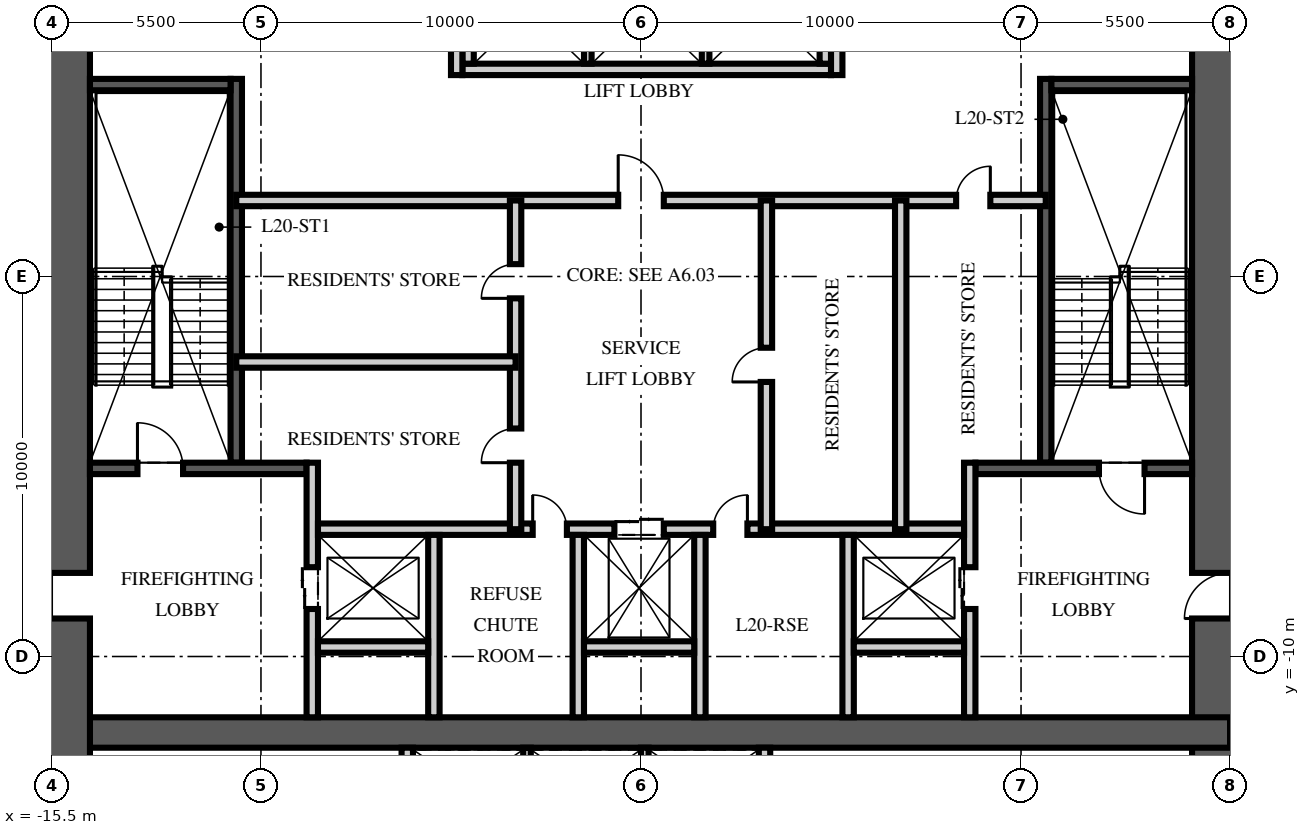
"""IFC4 building model, lengths in metres.
Left out: names, types, materials, properties, quantities, classifications, styles, units other than length and angle.
Written with IfcOpenShell. Run it as: python <this file> out.ifc"""

import sys

from ifc_helpers import new_model, si_unit, direction, frame, frame_2d, origin, place, context, subcontext, project, spatial, rectangle, extrude, element, fill, save


model = new_model("IFC4")
c1 = context("Model", 3, precision=1e-05, world=origin(), true_north=direction((0.0, 1.0)))
c2 = subcontext(c1, "Body", "Model", "MODEL_VIEW")
j1 = project(units=[si_unit("LENGTHUNIT", "METRE"), si_unit("PLANEANGLEUNIT", "RADIAN")], contexts=[c1])
p1 = place(None, origin())
s1 = spatial("IfcSite", under=j1, at=p1, CompositionType="ELEMENT")
p2 = place(p1, origin())
s2 = spatial("IfcBuilding", under=s1, at=p2, CompositionType="ELEMENT")
p3 = place(p2, frame((0.0, 0.0, 81.0)))
s3 = spatial("IfcBuildingStorey", under=s2, at=p3, CompositionType="ELEMENT", Elevation=81.0)
p4 = place(p3, frame((15.5, -15.5, -0.25), z_axis=(0.0, 0.0, 1.0), x_axis=(0.0, 1.0, 0.0)))
e1 = element("IfcWall", 1, at=p4, inside=s3, PredefinedType="SHEAR", context=c2, shape_type="SweptSolid", body=[
    extrude(rectangle(XDim=31.0, YDim=2.0, at=frame_2d((15.5, 0.0))), origin(), (0.0, 0.0, 1.0), 3.75),
])
p5 = place(p4, frame((6.5, 0.0, 0.25)))
e2 = element("IfcOpeningElement", 2, at=p5, cuts=e1, PredefinedType="OPENING", context=c2, shape_type="SweptSolid", body=[
    extrude(rectangle(XDim=1.2, YDim=2.1, at=frame_2d((0.6, 1.05))), frame((0.0, 1.01, 0.0), z_axis=(0.0, -1.0, 0.0), x_axis=(1.0, 0.0, 0.0)), (0.0, 0.0, 1.0), 2.02),
])
p6 = place(p4, frame((23.0, 0.0, 0.25)))
e3 = element("IfcOpeningElement", 3, at=p6, cuts=e1, PredefinedType="OPENING", context=c2, shape_type="SweptSolid", body=[
    extrude(rectangle(XDim=1.8, YDim=2.1, at=frame_2d((0.9, 1.05))), frame((0.0, 1.01, 0.0), z_axis=(0.0, -1.0, 0.0), x_axis=(1.0, 0.0, 0.0)), (0.0, 0.0, 1.0), 2.02),
])
p7 = place(p3, frame((-15.5, -12.0, -0.25), z_axis=(0.0, 0.0, 1.0), x_axis=(1.0, 0.0, 0.0)))
e4 = element("IfcWall", 4, at=p7, inside=s3, PredefinedType="SHEAR", context=c2, shape_type="SweptSolid", body=[
    extrude(rectangle(XDim=31.0, YDim=0.8, at=frame_2d((15.5, 0.0))), origin(), (0.0, 0.0, 1.0), 3.75),
])
p8 = place(p3, frame((-15.5, -15.5, -0.25), z_axis=(0.0, 0.0, 1.0), x_axis=(0.0, 1.0, 0.0)))
e5 = element("IfcWall", 5, at=p8, inside=s3, PredefinedType="SHEAR", context=c2, shape_type="SweptSolid", body=[
    extrude(rectangle(XDim=31.0, YDim=2.0, at=frame_2d((15.5, 0.0))), origin(), (0.0, 0.0, 1.0), 3.75),
])
p9 = place(p8, frame((6.5, 0.0, 0.25)))
e6 = element("IfcOpeningElement", 6, at=p9, cuts=e5, PredefinedType="OPENING", context=c2, shape_type="SweptSolid", body=[
    extrude(rectangle(XDim=1.2, YDim=2.1, at=frame_2d((0.6, 1.05))), frame((0.0, 1.01, 0.0), z_axis=(0.0, -1.0, 0.0), x_axis=(1.0, 0.0, 0.0)), (0.0, 0.0, 1.0), 2.02),
])
p10 = place(p8, frame((23.0, 0.0, 0.25)))
e7 = element("IfcOpeningElement", 7, at=p10, cuts=e5, PredefinedType="OPENING", context=c2, shape_type="SweptSolid", body=[
    extrude(rectangle(XDim=1.8, YDim=2.1, at=frame_2d((0.9, 1.05))), frame((0.0, 1.01, 0.0), z_axis=(0.0, -1.0, 0.0), x_axis=(1.0, 0.0, 0.0)), (0.0, 0.0, 1.0), 2.02),
])
p11 = place(p3, frame((-10.65, -4.9, 0.0), z_axis=(0.0, 0.0, 1.0), x_axis=(0.0, 1.0, 0.0)))
e8 = element("IfcWall", 8, at=p11, inside=s3, PredefinedType="SOLIDWALL", context=c2, shape_type="SweptSolid", body=[
    extrude(rectangle(XDim=10.1, YDim=0.3, at=frame_2d((5.05, 0.0))), origin(), (0.0, 0.0, 1.0), 3.5),
])
p12 = place(p3, frame((-14.5, -5.05, 0.0), z_axis=(0.0, 0.0, 1.0), x_axis=(1.0, 0.0, 0.0)))
e9 = element("IfcWall", 9, at=p12, inside=s3, PredefinedType="SOLIDWALL", context=c2, shape_type="SweptSolid", body=[
    extrude(rectangle(XDim=5.7, YDim=0.3, at=frame_2d((2.85, 0.0))), origin(), (0.0, 0.0, 1.0), 3.5),
])
p13 = place(p12, frame((1.25, 0.0, 0.0)))
e10 = element("IfcOpeningElement", 10, at=p13, cuts=e9, PredefinedType="OPENING", context=c2, shape_type="SweptSolid", body=[
    extrude(rectangle(XDim=1.2, YDim=2.1, at=frame_2d((0.6, 1.05))), frame((0.0, 0.16, 0.0), z_axis=(0.0, -1.0, 0.0), x_axis=(1.0, 0.0, 0.0)), (0.0, 0.0, 1.0), 0.32),
])
p14 = place(p3, frame((-14.5, 5.05, 0.0), z_axis=(0.0, 0.0, 1.0), x_axis=(1.0, 0.0, 0.0)))
e11 = element("IfcWall", 11, at=p14, inside=s3, PredefinedType="SOLIDWALL", context=c2, shape_type="SweptSolid", body=[
    extrude(rectangle(XDim=3.7, YDim=0.3, at=frame_2d((1.85, 0.0))), origin(), (0.0, 0.0, 1.0), 3.5),
])
p15 = place(p3, frame((-8.65, -11.6, 0.0), z_axis=(0.0, 0.0, 1.0), x_axis=(0.0, 1.0, 0.0)))
e12 = element("IfcWall", 12, at=p15, inside=s3, PredefinedType="PARTITIONING", context=c2, shape_type="SweptSolid", body=[
    extrude(rectangle(XDim=6.7, YDim=0.3, at=frame_2d((3.35, 0.0))), origin(), (0.0, 0.0, 1.0), 3.5),
])
p16 = place(p15, frame((2.85, 0.0, 0.0)))
e13 = element("IfcOpeningElement", 13, at=p16, cuts=e12, PredefinedType="OPENING", context=c2, shape_type="SweptSolid", body=[
    extrude(rectangle(XDim=1.1, YDim=2.1, at=frame_2d((0.55, 1.05))), frame((0.0, 0.16, 0.0), z_axis=(0.0, -1.0, 0.0), x_axis=(1.0, 0.0, 0.0)), (0.0, 0.0, 1.0), 0.32),
])
p17 = place(p3, frame((10.65, -4.9, 0.0), z_axis=(0.0, 0.0, 1.0), x_axis=(0.0, 1.0, 0.0)))
e14 = element("IfcWall", 14, at=p17, inside=s3, PredefinedType="SOLIDWALL", context=c2, shape_type="SweptSolid", body=[
    extrude(rectangle(XDim=10.1, YDim=0.3, at=frame_2d((5.05, 0.0))), origin(), (0.0, 0.0, 1.0), 3.5),
])
p18 = place(p3, frame((14.5, -5.05, 0.0), z_axis=(0.0, 0.0, 1.0), x_axis=(-1.0, 0.0, 0.0)))
e15 = element("IfcWall", 15, at=p18, inside=s3, PredefinedType="SOLIDWALL", context=c2, shape_type="SweptSolid", body=[
    extrude(rectangle(XDim=5.7, YDim=0.3, at=frame_2d((2.85, 0.0))), origin(), (0.0, 0.0, 1.0), 3.5),
])
p19 = place(p18, frame((1.25, 0.0, 0.0)))
e16 = element("IfcOpeningElement", 16, at=p19, cuts=e15, PredefinedType="OPENING", context=c2, shape_type="SweptSolid", body=[
    extrude(rectangle(XDim=1.2, YDim=2.1, at=frame_2d((0.6, 1.05))), frame((0.0, 0.16, 0.0), z_axis=(0.0, -1.0, 0.0), x_axis=(1.0, 0.0, 0.0)), (0.0, 0.0, 1.0), 0.32),
])
p20 = place(p3, frame((14.5, 5.05, 0.0), z_axis=(0.0, 0.0, 1.0), x_axis=(-1.0, 0.0, 0.0)))
e17 = element("IfcWall", 17, at=p20, inside=s3, PredefinedType="SOLIDWALL", context=c2, shape_type="SweptSolid", body=[
    extrude(rectangle(XDim=3.7, YDim=0.3, at=frame_2d((1.85, 0.0))), origin(), (0.0, 0.0, 1.0), 3.5),
])
p21 = place(p3, frame((8.65, -11.6, 0.0), z_axis=(0.0, 0.0, 1.0), x_axis=(0.0, 1.0, 0.0)))
e18 = element("IfcWall", 18, at=p21, inside=s3, PredefinedType="PARTITIONING", context=c2, shape_type="SweptSolid", body=[
    extrude(rectangle(XDim=6.7, YDim=0.3, at=frame_2d((3.35, 0.0))), origin(), (0.0, 0.0, 1.0), 3.5),
])
p22 = place(p21, frame((2.85, 0.0, 0.0)))
e19 = element("IfcOpeningElement", 19, at=p22, cuts=e18, PredefinedType="OPENING", context=c2, shape_type="SweptSolid", body=[
    extrude(rectangle(XDim=1.1, YDim=2.1, at=frame_2d((0.55, 1.05))), frame((0.0, 0.16, 0.0), z_axis=(0.0, -1.0, 0.0), x_axis=(1.0, 0.0, 0.0)), (0.0, 0.0, 1.0), 0.32),
])
p23 = place(p3, frame((-8.5, -6.65, 0.0), z_axis=(0.0, 0.0, 1.0), x_axis=(1.0, 0.0, 0.0)))
e20 = element("IfcWall", 20, at=p23, inside=s3, PredefinedType="PARTITIONING", context=c2, shape_type="SweptSolid", body=[
    extrude(rectangle(XDim=17.0, YDim=0.3, at=frame_2d((8.5, 0.0))), origin(), (0.0, 0.0, 1.0), 3.5),
])
p24 = place(p23, frame((7.8, 0.0, 0.0)))
e21 = element("IfcOpeningElement", 21, at=p24, cuts=e20, PredefinedType="OPENING", context=c2, shape_type="SweptSolid", body=[
    extrude(rectangle(XDim=1.3, YDim=2.4, at=frame_2d((0.65, 1.2))), frame((0.0, 0.16, 0.0), z_axis=(0.0, -1.0, 0.0), x_axis=(1.0, 0.0, 0.0)), (0.0, 0.0, 1.0), 0.32),
])
p25 = place(p23, frame((5.65, 0.0, 0.0)))
e22 = element("IfcOpeningElement", 22, at=p25, cuts=e20, PredefinedType="OPENING", context=c2, shape_type="SweptSolid", body=[
    extrude(rectangle(XDim=0.9, YDim=2.1, at=frame_2d((0.45, 1.05))), frame((0.0, 0.16, 0.0), z_axis=(0.0, -1.0, 0.0), x_axis=(1.0, 0.0, 0.0)), (0.0, 0.0, 1.0), 0.32),
])
p26 = place(p23, frame((10.4, 0.0, 0.0)))
e23 = element("IfcOpeningElement", 23, at=p26, cuts=e20, PredefinedType="OPENING", context=c2, shape_type="SweptSolid", body=[
    extrude(rectangle(XDim=0.9, YDim=2.1, at=frame_2d((0.45, 1.05))), frame((0.0, 0.16, 0.0), z_axis=(0.0, -1.0, 0.0), x_axis=(1.0, 0.0, 0.0)), (0.0, 0.0, 1.0), 0.32),
])
for number, where, z_axis, x_axis in (
    (24, (-5.45, -11.6, 0.0), (0.0, 0.0, 1.0), (0.0, 1.0, 0.0)),
    (25, (-1.65, -11.6, 0.0), (0.0, 0.0, 1.0), (0.0, 1.0, 0.0)),
    (26, (1.55, -11.6, 0.0), (0.0, 0.0, 1.0), (0.0, 1.0, 0.0)),
    (27, (5.45, -11.6, 0.0), (0.0, 0.0, 1.0), (0.0, 1.0, 0.0)),
):
    element("IfcWall", number, at=place(p3, frame(where, z_axis=z_axis, x_axis=x_axis)), inside=s3, PredefinedType="PARTITIONING", context=c2, shape_type="SweptSolid", body=[
        extrude(rectangle(XDim=4.8, YDim=0.3, at=frame_2d((2.4, 0.0))), origin(), (0.0, 0.0, 1.0), 3.5),
    ])
for number, where, z_axis, x_axis in (
    (28, (-8.5, -9.75, 0.0), (0.0, 0.0, 1.0), (1.0, 0.0, 0.0)),
    (29, (-1.5, -9.75, 0.0), (0.0, 0.0, 1.0), (1.0, 0.0, 0.0)),
    (30, (5.6, -9.75, 0.0), (0.0, 0.0, 1.0), (1.0, 0.0, 0.0)),
):
    element("IfcWall", number, at=place(p3, frame(where, z_axis=z_axis, x_axis=x_axis)), inside=s3, PredefinedType="PARTITIONING", context=c2, shape_type="SweptSolid", body=[
        extrude(rectangle(XDim=2.9, YDim=0.3, at=frame_2d((1.45, 0.0))), origin(), (0.0, 0.0, 1.0), 3.5),
    ])
p27 = place(p3, frame((-4.7, 5.45, 0.0), z_axis=(0.0, 0.0, 1.0), x_axis=(1.0, 0.0, 0.0)))
e31 = element("IfcWall", 31, at=p27, inside=s3, PredefinedType="PARTITIONING", context=c2, shape_type="SweptSolid", body=[
    extrude(rectangle(XDim=9.7, YDim=0.3, at=frame_2d((4.85, 0.0))), origin(), (0.0, 0.0, 1.0), 3.5),
])
for number, where, z_axis, x_axis in (
    (32, (-4.55, 5.6, 0.0), (0.0, 0.0, 1.0), (0.0, 1.0, 0.0)),
    (33, (4.85, 5.6, 0.0), (0.0, 0.0, 1.0), (0.0, 1.0, 0.0)),
):
    element("IfcWall", number, at=place(p3, frame(where, z_axis=z_axis, x_axis=x_axis)), inside=s3, PredefinedType="PARTITIONING", context=c2, shape_type="SweptSolid", body=[
        extrude(rectangle(XDim=2.8, YDim=0.3, at=frame_2d((1.4, 0.0))), origin(), (0.0, 0.0, 1.0), 3.5),
    ])
for number, where, z_axis, x_axis in (
    (34, (-1.4, 5.6, 0.0), (0.0, 0.0, 1.0), (0.0, 1.0, 0.0)),
    (35, (1.7, 5.6, 0.0), (0.0, 0.0, 1.0), (0.0, 1.0, 0.0)),
):
    element("IfcWall", number, at=place(p3, frame(where, z_axis=z_axis, x_axis=x_axis)), inside=s3, PredefinedType="PARTITIONING", context=c2, shape_type="SweptSolid", body=[
        extrude(rectangle(XDim=2.8, YDim=0.2, at=frame_2d((1.4, 0.0))), origin(), (0.0, 0.0, 1.0), 3.5),
    ])
for number, where, z_axis, x_axis in (
    (36, (-6.15, -14.5, 0.0), (0.0, 0.0, 1.0), (0.0, 1.0, 0.0)),
    (37, (3.25, -14.5, 0.0), (0.0, 0.0, 1.0), (0.0, 1.0, 0.0)),
):
    element("IfcWall", number, at=place(p3, frame(where, z_axis=z_axis, x_axis=x_axis)), inside=s3, PredefinedType="PARTITIONING", context=c2, shape_type="SweptSolid", body=[
        extrude(rectangle(XDim=2.1, YDim=0.3, at=frame_2d((1.05, 0.0))), origin(), (0.0, 0.0, 1.0), 3.5),
    ])
for number, where, z_axis, x_axis in (
    (38, (-3.0, -14.5, 0.0), (0.0, 0.0, 1.0), (0.0, 1.0, 0.0)),
    (39, (0.1, -14.5, 0.0), (0.0, 0.0, 1.0), (0.0, 1.0, 0.0)),
):
    element("IfcWall", number, at=place(p3, frame(where, z_axis=z_axis, x_axis=x_axis)), inside=s3, PredefinedType="PARTITIONING", context=c2, shape_type="SweptSolid", body=[
        extrude(rectangle(XDim=2.1, YDim=0.2, at=frame_2d((1.05, 0.0))), origin(), (0.0, 0.0, 1.0), 3.5),
    ])
p28 = place(p3, frame((-10.65, 2.0, 0.0), z_axis=(0.0, 0.0, 1.0), x_axis=(1.0, 0.0, 0.0)))
e40 = element("IfcWall", 40, at=p28, inside=s3, PredefinedType="PARTITIONING", context=c2, shape_type="SweptSolid", body=[
    extrude(rectangle(XDim=21.3, YDim=0.3, at=frame_2d((10.65, 0.0))), origin(), (0.0, 0.0, 1.0), 3.5),
])
p29 = place(p28, frame((10.05, 0.0, 0.0)))
e41 = element("IfcOpeningElement", 41, at=p29, cuts=e40, PredefinedType="OPENING", context=c2, shape_type="SweptSolid", body=[
    extrude(rectangle(XDim=1.2, YDim=2.1, at=frame_2d((0.6, 1.05))), frame((0.0, 0.16, 0.0), z_axis=(0.0, -1.0, 0.0), x_axis=(1.0, 0.0, 0.0)), (0.0, 0.0, 1.0), 0.32),
])
p30 = place(p28, frame((18.942, 0.0, 0.0)))
e42 = element("IfcOpeningElement", 42, at=p30, cuts=e40, PredefinedType="OPENING", context=c2, shape_type="SweptSolid", body=[
    extrude(rectangle(XDim=0.9, YDim=2.1, at=frame_2d((0.45, 1.05))), frame((0.0, 0.16, 0.0), z_axis=(0.0, -1.0, 0.0), x_axis=(1.0, 0.0, 0.0)), (0.0, 0.0, 1.0), 0.32),
])
p31 = place(p3, frame((-3.3, -6.65, 0.0), z_axis=(0.0, 0.0, 1.0), x_axis=(0.0, 1.0, 0.0)))
e43 = element("IfcWall", 43, at=p31, inside=s3, PredefinedType="PARTITIONING", context=c2, shape_type="SweptSolid", body=[
    extrude(rectangle(XDim=8.65, YDim=0.3, at=frame_2d((4.325, 0.0))), origin(), (0.0, 0.0, 1.0), 3.5),
])
p32 = place(p31, frame((1.75, 0.0, 0.0)))
e44 = element("IfcOpeningElement", 44, at=p32, cuts=e43, PredefinedType="OPENING", context=c2, shape_type="SweptSolid", body=[
    extrude(rectangle(XDim=0.9, YDim=2.1, at=frame_2d((0.45, 1.05))), frame((0.0, 0.16, 0.0), z_axis=(0.0, -1.0, 0.0), x_axis=(1.0, 0.0, 0.0)), (0.0, 0.0, 1.0), 0.32),
])
p33 = place(p31, frame((6.075, 0.0, 0.0)))
e45 = element("IfcOpeningElement", 45, at=p33, cuts=e43, PredefinedType="OPENING", context=c2, shape_type="SweptSolid", body=[
    extrude(rectangle(XDim=0.9, YDim=2.1, at=frame_2d((0.45, 1.05))), frame((0.0, 0.16, 0.0), z_axis=(0.0, -1.0, 0.0), x_axis=(1.0, 0.0, 0.0)), (0.0, 0.0, 1.0), 0.32),
])
p34 = place(p3, frame((3.3, -6.65, 0.0), z_axis=(0.0, 0.0, 1.0), x_axis=(0.0, 1.0, 0.0)))
e46 = element("IfcWall", 46, at=p34, inside=s3, PredefinedType="PARTITIONING", context=c2, shape_type="SweptSolid", body=[
    extrude(rectangle(XDim=8.65, YDim=0.3, at=frame_2d((4.325, 0.0))), origin(), (0.0, 0.0, 1.0), 3.5),
])
p35 = place(p34, frame((3.875, 0.0, 0.0)))
e47 = element("IfcOpeningElement", 47, at=p35, cuts=e46, PredefinedType="OPENING", context=c2, shape_type="SweptSolid", body=[
    extrude(rectangle(XDim=0.9, YDim=2.1, at=frame_2d((0.45, 1.05))), frame((0.0, 0.16, 0.0), z_axis=(0.0, -1.0, 0.0), x_axis=(1.0, 0.0, 0.0)), (0.0, 0.0, 1.0), 0.32),
])
p36 = place(p3, frame((-10.65, -2.25, 0.0), z_axis=(0.0, 0.0, 1.0), x_axis=(1.0, 0.0, 0.0)))
e48 = element("IfcWall", 48, at=p36, inside=s3, PredefinedType="PARTITIONING", context=c2, shape_type="SweptSolid", body=[
    extrude(rectangle(XDim=7.35, YDim=0.3, at=frame_2d((3.675, 0.0))), origin(), (0.0, 0.0, 1.0), 3.5),
])
p37 = place(p3, frame((6.834, -6.65, 0.0), z_axis=(0.0, 0.0, 1.0), x_axis=(0.0, 1.0, 0.0)))
e49 = element("IfcWall", 49, at=p37, inside=s3, PredefinedType="PARTITIONING", context=c2, shape_type="SweptSolid", body=[
    extrude(rectangle(XDim=8.65, YDim=0.3, at=frame_2d((4.325, 0.0))), origin(), (0.0, 0.0, 1.0), 3.5),
])
p38 = place(p3, frame((-4.85, 5.3, 0.0), z_axis=(0.0, 0.0, 1.0), x_axis=(0.0, 1.0, 0.0)))
e50 = element("IfcWall", 50, at=p38, inside=s3, PredefinedType="PARTITIONING", context=c2, shape_type="SweptSolid", body=[
    extrude(rectangle(XDim=6.3, YDim=0.3, at=frame_2d((3.15, 0.0))), origin(), (0.0, 0.0, 1.0), 3.5),
])
p39 = place(p38, frame((4.35, 0.0, 0.0)))
e51 = element("IfcOpeningElement", 51, at=p39, cuts=e50, PredefinedType="OPENING", context=c2, shape_type="SweptSolid", body=[
    extrude(rectangle(XDim=0.9, YDim=2.1, at=frame_2d((0.45, 1.05))), frame((0.0, 0.16, 0.0), z_axis=(0.0, -1.0, 0.0), x_axis=(1.0, 0.0, 0.0)), (0.0, 0.0, 1.0), 0.32),
])
p40 = place(p3, frame((5.15, 5.3, 0.0), z_axis=(0.0, 0.0, 1.0), x_axis=(0.0, 1.0, 0.0)))
e52 = element("IfcWall", 52, at=p40, inside=s3, PredefinedType="PARTITIONING", context=c2, shape_type="SweptSolid", body=[
    extrude(rectangle(XDim=6.3, YDim=0.3, at=frame_2d((3.15, 0.0))), origin(), (0.0, 0.0, 1.0), 3.5),
])
p41 = place(p13, origin())
e53 = element("IfcDoor", 53, at=p41, inside=s3, OperationType="SINGLE_SWING_LEFT", PredefinedType="DOOR", context=c2, shape_type="SweptSolid", body=[
    extrude(rectangle(XDim=1.2, YDim=2.1, at=frame_2d((0.6, 1.05))), frame((0.0, 0.025, 0.0), z_axis=(0.0, -1.0, 0.0), x_axis=(1.0, 0.0, 0.0)), (0.0, 0.0, 1.0), 0.05),
])
fill(e10, e53)
p42 = place(p9, origin())
e54 = element("IfcDoor", 54, at=p42, inside=s3, OperationType="SINGLE_SWING_LEFT", PredefinedType="DOOR", context=c2, shape_type="SweptSolid", body=[
    extrude(rectangle(XDim=1.2, YDim=2.1, at=frame_2d((0.6, 1.05))), frame((0.0, 0.025, 0.0), z_axis=(0.0, -1.0, 0.0), x_axis=(1.0, 0.0, 0.0)), (0.0, 0.0, 1.0), 0.05),
])
fill(e6, e54)
p43 = place(p19, origin())
e55 = element("IfcDoor", 55, at=p43, inside=s3, OperationType="SINGLE_SWING_LEFT", PredefinedType="DOOR", context=c2, shape_type="SweptSolid", body=[
    extrude(rectangle(XDim=1.2, YDim=2.1, at=frame_2d((0.6, 1.05))), frame((0.0, 0.025, 0.0), z_axis=(0.0, -1.0, 0.0), x_axis=(1.0, 0.0, 0.0)), (0.0, 0.0, 1.0), 0.05),
])
fill(e16, e55)
p44 = place(p5, origin())
e56 = element("IfcDoor", 56, at=p44, inside=s3, OperationType="SINGLE_SWING_LEFT", PredefinedType="DOOR", context=c2, shape_type="SweptSolid", body=[
    extrude(rectangle(XDim=1.2, YDim=2.1, at=frame_2d((0.6, 1.05))), frame((0.0, 0.025, 0.0), z_axis=(0.0, -1.0, 0.0), x_axis=(1.0, 0.0, 0.0)), (0.0, 0.0, 1.0), 0.05),
])
fill(e2, e56)
p45 = place(p16, origin())
e57 = element("IfcDoor", 57, at=p45, inside=s3, OperationType="DOUBLE_DOOR_SLIDING", PredefinedType="DOOR", context=c2, shape_type="SweptSolid", body=[
    extrude(rectangle(XDim=1.1, YDim=2.1, at=frame_2d((0.55, 1.05))), frame((0.0, 0.025, 0.0), z_axis=(0.0, -1.0, 0.0), x_axis=(1.0, 0.0, 0.0)), (0.0, 0.0, 1.0), 0.05),
])
fill(e13, e57)
p46 = place(p22, origin())
e58 = element("IfcDoor", 58, at=p46, inside=s3, OperationType="DOUBLE_DOOR_SLIDING", PredefinedType="DOOR", context=c2, shape_type="SweptSolid", body=[
    extrude(rectangle(XDim=1.1, YDim=2.1, at=frame_2d((0.55, 1.05))), frame((0.0, 0.025, 0.0), z_axis=(0.0, -1.0, 0.0), x_axis=(1.0, 0.0, 0.0)), (0.0, 0.0, 1.0), 0.05),
])
fill(e19, e58)
p47 = place(p24, origin())
e59 = element("IfcDoor", 59, at=p47, inside=s3, OperationType="DOUBLE_DOOR_SLIDING", PredefinedType="DOOR", context=c2, shape_type="SweptSolid", body=[
    extrude(rectangle(XDim=1.3, YDim=2.4, at=frame_2d((0.65, 1.2))), frame((0.0, 0.025, 0.0), z_axis=(0.0, -1.0, 0.0), x_axis=(1.0, 0.0, 0.0)), (0.0, 0.0, 1.0), 0.05),
])
fill(e21, e59)
p48 = place(p29, origin())
e60 = element("IfcDoor", 60, at=p48, inside=s3, OperationType="SINGLE_SWING_LEFT", PredefinedType="DOOR", context=c2, shape_type="SweptSolid", body=[
    extrude(rectangle(XDim=1.2, YDim=2.1, at=frame_2d((0.6, 1.05))), frame((0.0, 0.025, 0.0), z_axis=(0.0, -1.0, 0.0), x_axis=(1.0, 0.0, 0.0)), (0.0, 0.0, 1.0), 0.05),
])
fill(e41, e60)
p49 = place(p25, origin())
e61 = element("IfcDoor", 61, at=p49, inside=s3, OperationType="SINGLE_SWING_LEFT", PredefinedType="DOOR", context=c2, shape_type="SweptSolid", body=[
    extrude(rectangle(XDim=0.9, YDim=2.1, at=frame_2d((0.45, 1.05))), frame((0.0, 0.025, 0.0), z_axis=(0.0, -1.0, 0.0), x_axis=(1.0, 0.0, 0.0)), (0.0, 0.0, 1.0), 0.05),
])
fill(e22, e61)
p50 = place(p26, origin())
e62 = element("IfcDoor", 62, at=p50, inside=s3, OperationType="SINGLE_SWING_RIGHT", PredefinedType="DOOR", context=c2, shape_type="SweptSolid", body=[
    extrude(rectangle(XDim=0.9, YDim=2.1, at=frame_2d((0.45, 1.05))), frame((0.0, 0.025, 0.0), z_axis=(0.0, -1.0, 0.0), x_axis=(1.0, 0.0, 0.0)), (0.0, 0.0, 1.0), 0.05),
])
fill(e23, e62)
p51 = place(p32, origin())
e63 = element("IfcDoor", 63, at=p51, inside=s3, OperationType="SINGLE_SWING_LEFT", PredefinedType="DOOR", context=c2, shape_type="SweptSolid", body=[
    extrude(rectangle(XDim=0.9, YDim=2.1, at=frame_2d((0.45, 1.05))), frame((0.0, 0.025, 0.0), z_axis=(0.0, -1.0, 0.0), x_axis=(1.0, 0.0, 0.0)), (0.0, 0.0, 1.0), 0.05),
])
fill(e44, e63)
p52 = place(p33, origin())
e64 = element("IfcDoor", 64, at=p52, inside=s3, OperationType="SINGLE_SWING_LEFT", PredefinedType="DOOR", context=c2, shape_type="SweptSolid", body=[
    extrude(rectangle(XDim=0.9, YDim=2.1, at=frame_2d((0.45, 1.05))), frame((0.0, 0.025, 0.0), z_axis=(0.0, -1.0, 0.0), x_axis=(1.0, 0.0, 0.0)), (0.0, 0.0, 1.0), 0.05),
])
fill(e45, e64)
p53 = place(p35, origin())
e65 = element("IfcDoor", 65, at=p53, inside=s3, OperationType="SINGLE_SWING_LEFT", PredefinedType="DOOR", context=c2, shape_type="SweptSolid", body=[
    extrude(rectangle(XDim=0.9, YDim=2.1, at=frame_2d((0.45, 1.05))), frame((0.0, 0.025, 0.0), z_axis=(0.0, -1.0, 0.0), x_axis=(1.0, 0.0, 0.0)), (0.0, 0.0, 1.0), 0.05),
])
fill(e47, e65)
p54 = place(p30, origin())
e66 = element("IfcDoor", 66, at=p54, inside=s3, OperationType="SINGLE_SWING_RIGHT", PredefinedType="DOOR", context=c2, shape_type="SweptSolid", body=[
    extrude(rectangle(XDim=0.9, YDim=2.1, at=frame_2d((0.45, 1.05))), frame((0.0, 0.025, 0.0), z_axis=(0.0, -1.0, 0.0), x_axis=(1.0, 0.0, 0.0)), (0.0, 0.0, 1.0), 0.05),
])
fill(e42, e66)
save(model, sys.argv[1])
